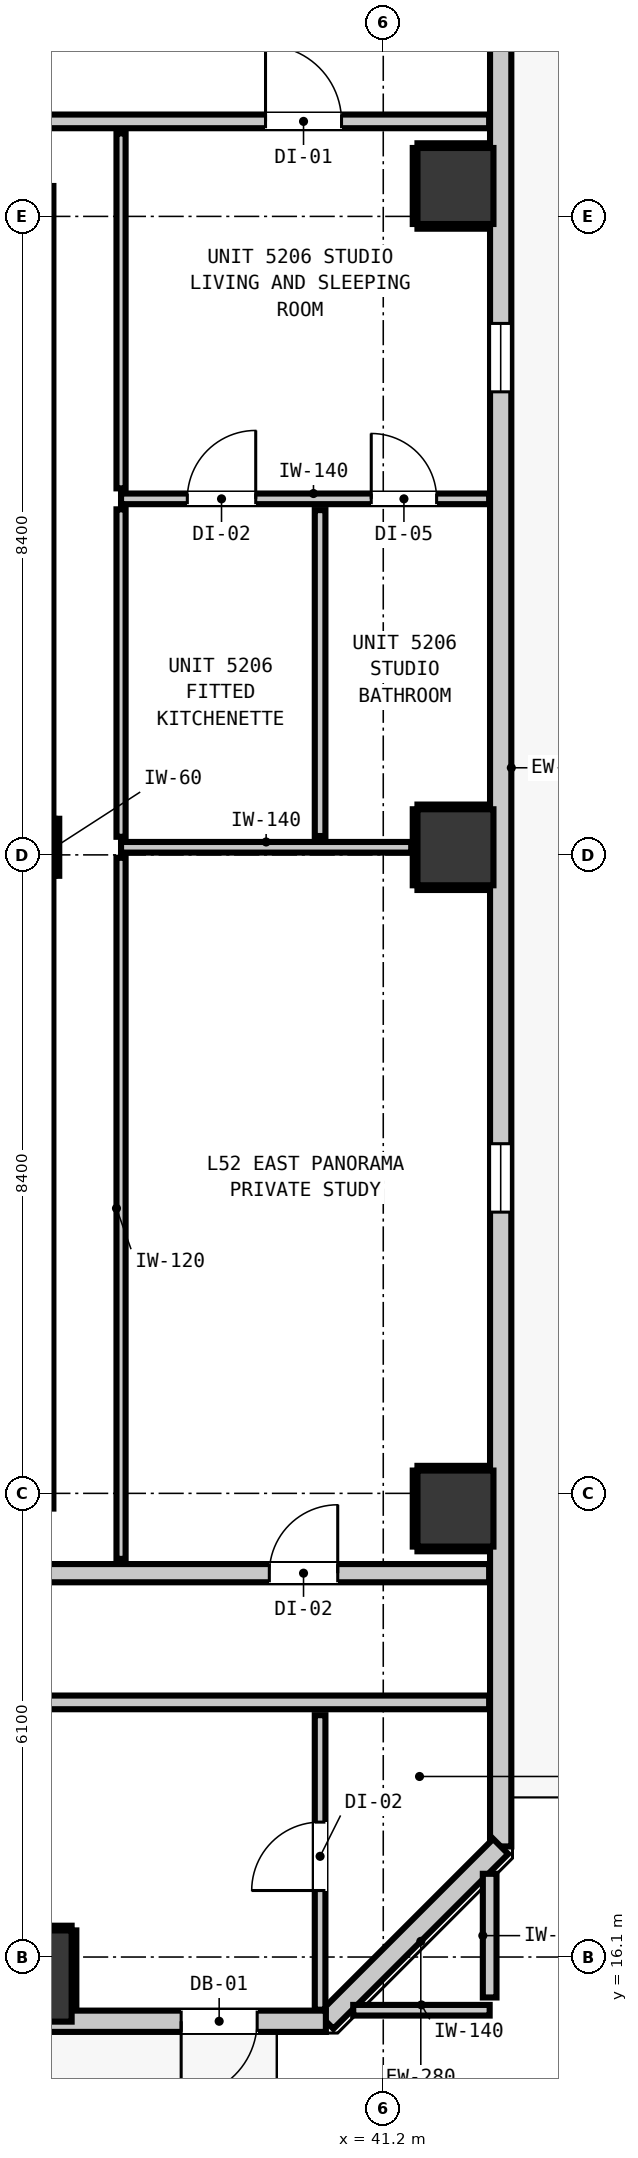
"""IFC4 building model, lengths in metres.
Left out: names, types, materials, properties, quantities, classifications, styles, units other than length and angle.
Written with IfcOpenShell. Run it as: python <this file> out.ifc"""

import sys

from ifc_helpers import new_model, si_unit, direction, frame, frame_2d, origin, origin_2d, place, context, subcontext, project, spatial, rectangle, extrude, element, fill, save


model = new_model("IFC4")
c1 = context("Model", 3, precision=1e-05, world=origin(), true_north=direction((0.0, 1.0)))
c2 = subcontext(c1, "Body", "Model", "MODEL_VIEW")
j1 = project(units=[si_unit("LENGTHUNIT", "METRE"), si_unit("PLANEANGLEUNIT", "RADIAN")], contexts=[c1])
p1 = place(None, origin())
s1 = spatial("IfcSite", under=j1, at=p1, CompositionType="ELEMENT")
p2 = place(p1, origin())
s2 = spatial("IfcBuilding", under=s1, at=p2, CompositionType="ELEMENT")
p3 = place(p2, frame((0.0, 0.0, 180.2)))
s3 = spatial("IfcBuildingStorey", under=s2, at=p3, CompositionType="ELEMENT", Elevation=180.2)
p4 = place(p3, frame((36.5, 30.7, 0.0), z_axis=(0.0, 0.0, 1.0), x_axis=(1.0, 0.0, 0.0)))
e1 = element("IfcColumn", 1, at=p4, inside=s3, PredefinedType="COLUMN", context=c2, shape_type="SweptSolid", body=[
    extrude(rectangle(XDim=0.75, YDim=0.75, at=origin_2d()), origin(), (0.0, 0.0, 1.0), 3.32),
])
p5 = place(p3, frame((36.46, 22.0, 0.0), z_axis=(0.0, 0.0, 1.0), x_axis=(0.0, 1.0, 0.0)))
e2 = element("IfcWall", 2, at=p5, inside=s3, PredefinedType="SHEAR", context=c2, shape_type="SweptSolid", body=[
    extrude(rectangle(XDim=8.32, YDim=0.8, at=frame_2d((4.16, 0.0))), origin(), (0.0, 0.0, 1.0), 3.32),
])
p6 = place(p3, frame((36.46, 31.08, 0.0), z_axis=(0.0, 0.0, 1.0), x_axis=(0.0, 1.0, 0.0)))
e3 = element("IfcWall", 3, at=p6, inside=s3, PredefinedType="SHEAR", context=c2, shape_type="SweptSolid", body=[
    extrude(rectangle(XDim=8.32, YDim=0.8, at=frame_2d((4.16, 0.0))), origin(), (0.0, 0.0, 1.0), 3.32),
])
p7 = place(p3, frame((36.5, 15.85, 0.0), z_axis=(0.0, 0.0, 1.0), x_axis=(1.0, 0.0, 0.0)))
e4 = element("IfcColumn", 4, at=p7, inside=s3, PredefinedType="COLUMN", context=c2, shape_type="SweptSolid", body=[
    extrude(rectangle(XDim=1.2, YDim=1.2, at=origin_2d()), origin(), (0.0, 0.0, 1.0), 3.32),
])
for number, where, z_axis, x_axis in (
    (5, (42.15, 22.0, 0.0), (0.0, 0.0, 1.0), (1.0, 0.0, 0.0)),
    (6, (42.15, 30.7, 0.0), (0.0, 0.0, 1.0), (1.0, 0.0, 0.0)),
    (7, (42.15, 39.4, 0.0), (0.0, 0.0, 1.0), (1.0, 0.0, 0.0)),
):
    element("IfcColumn", number, at=place(p3, frame(where, z_axis=z_axis, x_axis=x_axis)), inside=s3, PredefinedType="COLUMN", context=c2, shape_type="SweptSolid", body=[
        extrude(rectangle(XDim=1.0, YDim=1.0, at=origin_2d()), origin(), (0.0, 0.0, 1.0), 3.32),
    ])
p8 = place(p3, frame((42.745, 49.845, 0.0), z_axis=(0.0, 0.0, 1.0), x_axis=(0.0, -1.0, 0.0)))
e8 = element("IfcWall", 8, at=p8, inside=s3, PredefinedType="STANDARD", context=c2, shape_type="SweptSolid", body=[
    extrude(rectangle(XDim=32.29, YDim=0.28, at=frame_2d((16.145, 0.0))), origin(), (0.0, 0.0, 1.0), 3.08),
])
p9 = place(p8, frame((0.904, 0.0, 0.0)))
e9 = element("IfcOpeningElement", 9, at=p9, cuts=e8, PredefinedType="OPENING", context=c2, shape_type="SweptSolid", body=[
    extrude(rectangle(XDim=1.0, YDim=2.15, at=frame_2d((0.5, 1.075))), frame((0.0, 0.15, 0.0), z_axis=(0.0, -1.0, 0.0), x_axis=(1.0, 0.0, 0.0)), (0.0, 0.0, 1.0), 0.3),
])
p10 = place(p8, frame((5.02, 0.0, 0.85)))
e10 = element("IfcOpeningElement", 10, at=p10, cuts=e8, PredefinedType="OPENING", context=c2, shape_type="SweptSolid", body=[
    extrude(rectangle(XDim=0.9, YDim=1.5, at=frame_2d((0.45, 0.75))), frame((0.0, 0.15, 0.0), z_axis=(0.0, -1.0, 0.0), x_axis=(1.0, 0.0, 0.0)), (0.0, 0.0, 1.0), 0.3),
])
p11 = place(p8, frame((23.045, 0.0, 0.85)))
e11 = element("IfcOpeningElement", 11, at=p11, cuts=e8, PredefinedType="OPENING", context=c2, shape_type="SweptSolid", body=[
    extrude(rectangle(XDim=0.9, YDim=1.5, at=frame_2d((0.45, 0.75))), frame((0.0, 0.15, 0.0), z_axis=(0.0, -1.0, 0.0), x_axis=(1.0, 0.0, 0.0)), (0.0, 0.0, 1.0), 0.3),
])
p12 = place(p8, frame((12.253, 0.0, 0.85)))
e12 = element("IfcOpeningElement", 12, at=p12, cuts=e8, PredefinedType="OPENING", context=c2, shape_type="SweptSolid", body=[
    extrude(rectangle(XDim=0.9, YDim=1.5, at=frame_2d((0.45, 0.75))), frame((0.0, 0.15, 0.0), z_axis=(0.0, -1.0, 0.0), x_axis=(1.0, 0.0, 0.0)), (0.0, 0.0, 1.0), 0.3),
])
p13 = place(p3, frame((42.745, 17.555, 0.0), z_axis=(0.0, 0.0, 1.0), x_axis=(-0.707106781187, -0.707106781187, 0.0)))
e13 = element("IfcWall", 13, at=p13, inside=s3, PredefinedType="STANDARD", context=c2, shape_type="SweptSolid", body=[
    extrude(rectangle(XDim=3.253, YDim=0.28, at=frame_2d((1.626, 0.0))), origin(), (0.0, 0.0, 1.0), 3.08),
])
p14 = place(p3, frame((40.445, 15.255, 0.0), z_axis=(0.0, 0.0, 1.0), x_axis=(-1.0, 0.0, 0.0)))
e14 = element("IfcWall", 14, at=p14, inside=s3, PredefinedType="STANDARD", context=c2, shape_type="SweptSolid", body=[
    extrude(rectangle(XDim=35.09, YDim=0.28, at=frame_2d((17.545, 0.0))), origin(), (0.0, 0.0, 1.0), 3.08),
])
p15 = place(p14, frame((0.904, 0.0, 0.0)))
e15 = element("IfcOpeningElement", 15, at=p15, cuts=e14, PredefinedType="OPENING", context=c2, shape_type="SweptSolid", body=[
    extrude(rectangle(XDim=1.0, YDim=2.15, at=frame_2d((0.5, 1.075))), frame((0.0, 0.15, 0.0), z_axis=(0.0, -1.0, 0.0), x_axis=(1.0, 0.0, 0.0)), (0.0, 0.0, 1.0), 0.3),
])
p16 = place(p14, frame((30.873, 0.0, 0.85)))
e16 = element("IfcOpeningElement", 16, at=p16, cuts=e14, PredefinedType="OPENING", context=c2, shape_type="SweptSolid", body=[
    extrude(rectangle(XDim=0.9, YDim=1.5, at=frame_2d((0.45, 0.75))), frame((0.0, 0.15, 0.0), z_axis=(0.0, -1.0, 0.0), x_axis=(1.0, 0.0, 0.0)), (0.0, 0.0, 1.0), 0.3),
])
p17 = place(p14, frame((7.145, 0.0, 0.85)))
e17 = element("IfcOpeningElement", 17, at=p17, cuts=e14, PredefinedType="OPENING", context=c2, shape_type="SweptSolid", body=[
    extrude(rectangle(XDim=0.9, YDim=1.5, at=frame_2d((0.45, 0.75))), frame((0.0, 0.15, 0.0), z_axis=(0.0, -1.0, 0.0), x_axis=(1.0, 0.0, 0.0)), (0.0, 0.0, 1.0), 0.3),
])
p18 = place(p3, frame((12.983, 21.15, 0.0), z_axis=(0.0, 0.0, 1.0), x_axis=(1.0, 0.0, 0.0)))
e18 = element("IfcWall", 18, at=p18, inside=s3, PredefinedType="PARTITIONING", context=c2, shape_type="SweptSolid", body=[
    extrude(rectangle(XDim=29.61, YDim=0.24, at=frame_2d((14.805, 0.0))), origin(), (0.0, 0.0, 1.0), 3.08),
])
p19 = place(p18, frame((5.227, 0.0, 0.0)))
e19 = element("IfcOpeningElement", 19, at=p19, cuts=e18, PredefinedType="OPENING", context=c2, shape_type="SweptSolid", body=[
    extrude(rectangle(XDim=1.1, YDim=2.15, at=frame_2d((0.55, 1.075))), frame((0.0, 0.13, 0.0), z_axis=(0.0, -1.0, 0.0), x_axis=(1.0, 0.0, 0.0)), (0.0, 0.0, 1.0), 0.26),
])
p20 = place(p18, frame((26.718, 0.0, 0.0)))
e20 = element("IfcOpeningElement", 20, at=p20, cuts=e18, PredefinedType="OPENING", context=c2, shape_type="SweptSolid", body=[
    extrude(rectangle(XDim=0.9, YDim=2.1, at=frame_2d((0.45, 1.05))), frame((0.0, 0.13, 0.0), z_axis=(0.0, -1.0, 0.0), x_axis=(1.0, 0.0, 0.0)), (0.0, 0.0, 1.0), 0.26),
])
p21 = place(p3, frame((12.983, 19.45, 0.0), z_axis=(0.0, 0.0, 1.0), x_axis=(1.0, 0.0, 0.0)))
e21 = element("IfcWall", 21, at=p21, inside=s3, PredefinedType="PARTITIONING", context=c2, shape_type="SweptSolid", body=[
    extrude(rectangle(XDim=29.61, YDim=0.18, at=frame_2d((14.805, 0.0))), origin(), (0.0, 0.0, 1.0), 3.08),
])
p22 = place(p21, frame((0.754, 0.0, 0.0)))
e22 = element("IfcOpeningElement", 22, at=p22, cuts=e21, PredefinedType="OPENING", context=c2, shape_type="SweptSolid", body=[
    extrude(rectangle(XDim=1.0, YDim=2.15, at=frame_2d((0.5, 1.075))), frame((0.0, 0.1, 0.0), z_axis=(0.0, -1.0, 0.0), x_axis=(1.0, 0.0, 0.0)), (0.0, 0.0, 1.0), 0.2),
])
p23 = place(p21, frame((20.454, 0.0, 0.0)))
e23 = element("IfcOpeningElement", 23, at=p23, cuts=e21, PredefinedType="OPENING", context=c2, shape_type="SweptSolid", body=[
    extrude(rectangle(XDim=1.0, YDim=2.15, at=frame_2d((0.5, 1.075))), frame((0.0, 0.1, 0.0), z_axis=(0.0, -1.0, 0.0), x_axis=(1.0, 0.0, 0.0)), (0.0, 0.0, 1.0), 0.2),
])
p24 = place(p3, frame((3.207, 40.25, 0.0), z_axis=(0.0, 0.0, 1.0), x_axis=(1.0, 0.0, 0.0)))
e24 = element("IfcWall", 24, at=p24, inside=s3, PredefinedType="PARTITIONING", context=c2, shape_type="SweptSolid", body=[
    extrude(rectangle(XDim=39.386, YDim=0.18, at=frame_2d((19.693, 0.0))), origin(), (0.0, 0.0, 1.0), 3.08),
])
p25 = place(p24, frame((14.228, 0.0, 0.0)))
e25 = element("IfcOpeningElement", 25, at=p25, cuts=e24, PredefinedType="OPENING", context=c2, shape_type="SweptSolid", body=[
    extrude(rectangle(XDim=1.4, YDim=2.15, at=frame_2d((0.7, 1.075))), frame((0.0, 0.1, 0.0), z_axis=(0.0, -1.0, 0.0), x_axis=(1.0, 0.0, 0.0)), (0.0, 0.0, 1.0), 0.2),
])
p26 = place(p24, frame((4.042, 0.0, 0.0)))
e26 = element("IfcOpeningElement", 26, at=p26, cuts=e24, PredefinedType="OPENING", context=c2, shape_type="SweptSolid", body=[
    extrude(rectangle(XDim=0.9, YDim=2.1, at=frame_2d((0.45, 1.05))), frame((0.0, 0.1, 0.0), z_axis=(0.0, -1.0, 0.0), x_axis=(1.0, 0.0, 0.0)), (0.0, 0.0, 1.0), 0.2),
])
p27 = place(p24, frame((36.444, 0.0, 0.0)))
e27 = element("IfcOpeningElement", 27, at=p27, cuts=e24, PredefinedType="OPENING", context=c2, shape_type="SweptSolid", body=[
    extrude(rectangle(XDim=1.0, YDim=2.15, at=frame_2d((0.5, 1.075))), frame((0.0, 0.1, 0.0), z_axis=(0.0, -1.0, 0.0), x_axis=(1.0, 0.0, 0.0)), (0.0, 0.0, 1.0), 0.2),
])
p28 = place(p3, frame((40.805, 15.4, 0.0), z_axis=(0.0, 0.0, 1.0), x_axis=(1.0, 0.0, 0.0)))
e28 = element("IfcWall", 28, at=p28, inside=s3, PredefinedType="PARTITIONING", context=c2, shape_type="SweptSolid", body=[
    extrude(rectangle(XDim=1.795, YDim=0.14, at=frame_2d((0.897, 0.0))), origin(), (0.0, 0.0, 1.0), 3.08),
])
p29 = place(p3, frame((37.75, 30.7, 0.0), z_axis=(0.0, 0.0, 1.0), x_axis=(1.0, 0.0, 0.0)))
e29 = element("IfcWall", 29, at=p29, inside=s3, PredefinedType="PARTITIONING", context=c2, shape_type="SweptSolid", body=[
    extrude(rectangle(XDim=3.818, YDim=0.14, at=frame_2d((1.909, 0.0))), origin(), (0.0, 0.0, 1.0), 2.315),
])
p30 = place(p3, frame((37.75, 35.284, 0.0), z_axis=(0.0, 0.0, 1.0), x_axis=(1.0, 0.0, 0.0)))
e30 = element("IfcWall", 30, at=p30, inside=s3, PredefinedType="PARTITIONING", context=c2, shape_type="SweptSolid", body=[
    extrude(rectangle(XDim=4.843, YDim=0.14, at=frame_2d((2.421, 0.0))), origin(), (0.0, 0.0, 1.0), 3.08),
])
p31 = place(p30, frame((0.872, 0.0, 0.0)))
e31 = element("IfcOpeningElement", 31, at=p31, cuts=e30, PredefinedType="OPENING", context=c2, shape_type="SweptSolid", body=[
    extrude(rectangle(XDim=0.9, YDim=2.1, at=frame_2d((0.45, 1.05))), frame((0.0, 0.08, 0.0), z_axis=(0.0, -1.0, 0.0), x_axis=(1.0, 0.0, 0.0)), (0.0, 0.0, 1.0), 0.16),
])
p32 = place(p30, frame((3.292, 0.0, 0.0)))
e32 = element("IfcOpeningElement", 32, at=p32, cuts=e30, PredefinedType="OPENING", context=c2, shape_type="SweptSolid", body=[
    extrude(rectangle(XDim=0.86, YDim=2.02, at=frame_2d((0.43, 1.01))), frame((0.0, 0.08, 0.0), z_axis=(0.0, -1.0, 0.0), x_axis=(1.0, 0.0, 0.0)), (0.0, 0.0, 1.0), 0.16),
])
p33 = place(p3, frame((42.6, 15.568, 0.0), z_axis=(0.0, 0.0, 1.0), x_axis=(0.0, 1.0, 0.0)))
e33 = element("IfcWall", 33, at=p33, inside=s3, PredefinedType="PARTITIONING", context=c2, shape_type="SweptSolid", body=[
    extrude(rectangle(XDim=1.627, YDim=0.18, at=frame_2d((0.813, 0.0))), origin(), (0.0, 0.0, 1.0), 3.08),
])
p34 = place(p3, frame((40.369, 15.407, 0.0), z_axis=(0.0, 0.0, 1.0), x_axis=(0.0, 1.0, 0.0)))
e34 = element("IfcWall", 34, at=p34, inside=s3, PredefinedType="PARTITIONING", context=c2, shape_type="SweptSolid", body=[
    extrude(rectangle(XDim=3.875, YDim=0.14, at=frame_2d((1.938, 0.0))), origin(), (0.0, 0.0, 1.0), 3.08),
])
p35 = place(p34, frame((1.568, 0.0, 0.0)))
e35 = element("IfcOpeningElement", 35, at=p35, cuts=e34, PredefinedType="OPENING", context=c2, shape_type="SweptSolid", body=[
    extrude(rectangle(XDim=0.9, YDim=2.1, at=frame_2d((0.45, 1.05))), frame((0.0, 0.08, 0.0), z_axis=(0.0, -1.0, 0.0), x_axis=(1.0, 0.0, 0.0)), (0.0, 0.0, 1.0), 0.16),
])
p36 = place(p3, frame((40.369, 30.848, 0.0), z_axis=(0.0, 0.0, 1.0), x_axis=(0.0, 1.0, 0.0)))
e36 = element("IfcWall", 36, at=p36, inside=s3, PredefinedType="PARTITIONING", context=c2, shape_type="SweptSolid", body=[
    extrude(rectangle(XDim=4.288, YDim=0.14, at=frame_2d((2.144, 0.0))), origin(), (0.0, 0.0, 1.0), 3.08),
])
p37 = place(p3, frame((37.75, 21.338, 0.0), z_axis=(0.0, 0.0, 1.0), x_axis=(0.0, 1.0, 0.0)))
e37 = element("IfcWall", 37, at=p37, inside=s3, PredefinedType="PARTITIONING", context=c2, shape_type="SweptSolid", body=[
    extrude(rectangle(XDim=9.224, YDim=0.12, at=frame_2d((4.612, 0.0))), origin(), (0.0, 0.0, 1.0), 3.08),
])
p38 = place(p3, frame((37.75, 30.838, 0.0), z_axis=(0.0, 0.0, 1.0), x_axis=(0.0, 1.0, 0.0)))
e38 = element("IfcWall", 38, at=p38, inside=s3, PredefinedType="PARTITIONING", context=c2, shape_type="SweptSolid", body=[
    extrude(rectangle(XDim=4.308, YDim=0.12, at=frame_2d((2.154, 0.0))), origin(), (0.0, 0.0, 1.0), 3.08),
])
p39 = place(p3, frame((37.75, 35.422, 0.0), z_axis=(0.0, 0.0, 1.0), x_axis=(0.0, 1.0, 0.0)))
e39 = element("IfcWall", 39, at=p39, inside=s3, PredefinedType="PARTITIONING", context=c2, shape_type="SweptSolid", body=[
    extrude(rectangle(XDim=4.67, YDim=0.12, at=frame_2d((2.335, 0.0))), origin(), (0.0, 0.0, 1.0), 3.08),
])
p40 = place(p3, frame((36.907, 30.325, 0.0), z_axis=(0.0, 0.0, 1.0), x_axis=(0.0, 1.0, 0.0)))
e40 = element("IfcWall", 40, at=p40, inside=s3, PredefinedType="PARTITIONING", context=c2, shape_type="SweptSolid", body=[
    extrude(rectangle(XDim=0.75, YDim=0.06, at=frame_2d((0.375, 0.0))), origin(), (0.0, 0.0, 1.0), 1.45),
])
p41 = place(p3, frame((35.9, 16.482, 0.0), z_axis=(0.0, 0.0, 1.0), x_axis=(1.0, 0.0, 0.0)))
e41 = element("IfcWall", 41, at=p41, inside=s3, PredefinedType="PARTITIONING", context=c2, shape_type="SweptSolid", body=[
    extrude(rectangle(XDim=1.2, YDim=0.06, at=frame_2d((0.6, 0.0))), origin(), (0.0, 0.0, 1.0), 1.45),
])
p42 = place(p3, frame((37.132, 15.41, 0.0), z_axis=(0.0, 0.0, 1.0), x_axis=(0.0, 1.0, 0.0)))
e42 = element("IfcWall", 42, at=p42, inside=s3, PredefinedType="PARTITIONING", context=c2, shape_type="SweptSolid", body=[
    extrude(rectangle(XDim=1.04, YDim=0.06, at=frame_2d((0.52, 0.0))), origin(), (0.0, 0.0, 1.0), 1.45),
])
for number, where, z_axis, x_axis in (
    (43, (41.65, 21.468, 0.0), (0.0, 0.0, 1.0), (1.0, 0.0, 0.0)),
    (44, (41.65, 22.532, 0.0), (0.0, 0.0, 1.0), (1.0, 0.0, 0.0)),
):
    element("IfcWall", number, at=place(p3, frame(where, z_axis=z_axis, x_axis=x_axis)), inside=s3, PredefinedType="PARTITIONING", context=c2, shape_type="SweptSolid", body=[
        extrude(rectangle(XDim=0.94, YDim=0.06, at=frame_2d((0.47, 0.0))), origin(), (0.0, 0.0, 1.0), 1.45),
    ])
p43 = place(p3, frame((41.618, 21.5, 0.0), z_axis=(0.0, 0.0, 1.0), x_axis=(0.0, 1.0, 0.0)))
e45 = element("IfcWall", 45, at=p43, inside=s3, PredefinedType="PARTITIONING", context=c2, shape_type="SweptSolid", body=[
    extrude(rectangle(XDim=1.0, YDim=0.06, at=frame_2d((0.5, 0.0))), origin(), (0.0, 0.0, 1.0), 1.45),
])
for number, where, z_axis, x_axis in (
    (46, (41.65, 30.168, 0.0), (0.0, 0.0, 1.0), (1.0, 0.0, 0.0)),
    (47, (41.65, 31.232, 0.0), (0.0, 0.0, 1.0), (1.0, 0.0, 0.0)),
):
    element("IfcWall", number, at=place(p3, frame(where, z_axis=z_axis, x_axis=x_axis)), inside=s3, PredefinedType="PARTITIONING", context=c2, shape_type="SweptSolid", body=[
        extrude(rectangle(XDim=0.94, YDim=0.06, at=frame_2d((0.47, 0.0))), origin(), (0.0, 0.0, 1.0), 1.45),
    ])
p44 = place(p3, frame((41.618, 30.2, 0.0), z_axis=(0.0, 0.0, 1.0), x_axis=(0.0, 1.0, 0.0)))
e48 = element("IfcWall", 48, at=p44, inside=s3, PredefinedType="PARTITIONING", context=c2, shape_type="SweptSolid", body=[
    extrude(rectangle(XDim=1.0, YDim=0.06, at=frame_2d((0.5, 0.0))), origin(), (0.0, 0.0, 1.0), 1.45),
])
for number, where, z_axis, x_axis in (
    (49, (41.65, 38.868, 0.0), (0.0, 0.0, 1.0), (1.0, 0.0, 0.0)),
    (50, (41.65, 39.932, 0.0), (0.0, 0.0, 1.0), (1.0, 0.0, 0.0)),
):
    element("IfcWall", number, at=place(p3, frame(where, z_axis=z_axis, x_axis=x_axis)), inside=s3, PredefinedType="PARTITIONING", context=c2, shape_type="SweptSolid", body=[
        extrude(rectangle(XDim=0.94, YDim=0.06, at=frame_2d((0.47, 0.0))), origin(), (0.0, 0.0, 1.0), 1.45),
    ])
p45 = place(p3, frame((41.618, 38.9, 0.0), z_axis=(0.0, 0.0, 1.0), x_axis=(0.0, 1.0, 0.0)))
e51 = element("IfcWall", 51, at=p45, inside=s3, PredefinedType="PARTITIONING", context=c2, shape_type="SweptSolid", body=[
    extrude(rectangle(XDim=1.0, YDim=0.06, at=frame_2d((0.5, 0.0))), origin(), (0.0, 0.0, 1.0), 1.45),
])
p46 = place(p15, origin())
e52 = element("IfcDoor", 52, at=p46, inside=s3, OperationType="SINGLE_SWING_RIGHT", PredefinedType="DOOR", context=c2, shape_type="SweptSolid", body=[
    extrude(rectangle(XDim=1.0, YDim=2.15, at=frame_2d((0.5, 1.075))), frame((0.0, 0.025, 0.0), z_axis=(0.0, -1.0, 0.0), x_axis=(1.0, 0.0, 0.0)), (0.0, 0.0, 1.0), 0.05),
])
fill(e15, e52)
p47 = place(p11, origin())
e53 = element("IfcWindow", 53, at=p47, inside=s3, PartitioningType="SINGLE_PANEL", PredefinedType="WINDOW", context=c2, shape_type="SweptSolid", body=[
    extrude(rectangle(XDim=0.9, YDim=1.5, at=frame_2d((0.45, 0.75))), frame((0.0, 0.03, 0.0), z_axis=(0.0, -1.0, 0.0), x_axis=(1.0, 0.0, 0.0)), (0.0, 0.0, 1.0), 0.06),
])
fill(e11, e53)
p48 = place(p12, origin())
e54 = element("IfcWindow", 54, at=p48, inside=s3, PartitioningType="SINGLE_PANEL", PredefinedType="WINDOW", context=c2, shape_type="SweptSolid", body=[
    extrude(rectangle(XDim=0.9, YDim=1.5, at=frame_2d((0.45, 0.75))), frame((0.0, 0.03, 0.0), z_axis=(0.0, -1.0, 0.0), x_axis=(1.0, 0.0, 0.0)), (0.0, 0.0, 1.0), 0.06),
])
fill(e12, e54)
p49 = place(p35, origin())
e55 = element("IfcDoor", 55, at=p49, inside=s3, OperationType="SINGLE_SWING_LEFT", PredefinedType="DOOR", context=c2, shape_type="SweptSolid", body=[
    extrude(rectangle(XDim=0.9, YDim=2.1, at=frame_2d((0.45, 1.05))), frame((0.0, 0.025, 0.0), z_axis=(0.0, -1.0, 0.0), x_axis=(1.0, 0.0, 0.0)), (0.0, 0.0, 1.0), 0.05),
])
fill(e35, e55)
p50 = place(p20, origin())
e56 = element("IfcDoor", 56, at=p50, inside=s3, OperationType="SINGLE_SWING_RIGHT", PredefinedType="DOOR", context=c2, shape_type="SweptSolid", body=[
    extrude(rectangle(XDim=0.9, YDim=2.1, at=frame_2d((0.45, 1.05))), frame((0.0, 0.025, 0.0), z_axis=(0.0, -1.0, 0.0), x_axis=(1.0, 0.0, 0.0)), (0.0, 0.0, 1.0), 0.05),
])
fill(e20, e56)
p51 = place(p27, origin())
e57 = element("IfcDoor", 57, at=p51, inside=s3, OperationType="SINGLE_SWING_LEFT", PredefinedType="DOOR", context=c2, shape_type="SweptSolid", body=[
    extrude(rectangle(XDim=1.0, YDim=2.15, at=frame_2d((0.5, 1.075))), frame((0.0, 0.025, 0.0), z_axis=(0.0, -1.0, 0.0), x_axis=(1.0, 0.0, 0.0)), (0.0, 0.0, 1.0), 0.05),
])
fill(e27, e57)
p52 = place(p31, origin())
e58 = element("IfcDoor", 58, at=p52, inside=s3, OperationType="SINGLE_SWING_RIGHT", PredefinedType="DOOR", context=c2, shape_type="SweptSolid", body=[
    extrude(rectangle(XDim=0.9, YDim=2.1, at=frame_2d((0.45, 1.05))), frame((0.0, 0.025, 0.0), z_axis=(0.0, -1.0, 0.0), x_axis=(1.0, 0.0, 0.0)), (0.0, 0.0, 1.0), 0.05),
])
fill(e31, e58)
p53 = place(p32, origin())
e59 = element("IfcDoor", 59, at=p53, inside=s3, OperationType="SINGLE_SWING_LEFT", PredefinedType="DOOR", context=c2, shape_type="SweptSolid", body=[
    extrude(rectangle(XDim=0.86, YDim=2.02, at=frame_2d((0.43, 1.01))), frame((0.0, 0.025, 0.0), z_axis=(0.0, -1.0, 0.0), x_axis=(1.0, 0.0, 0.0)), (0.0, 0.0, 1.0), 0.05),
])
fill(e32, e59)
save(model, sys.argv[1])
